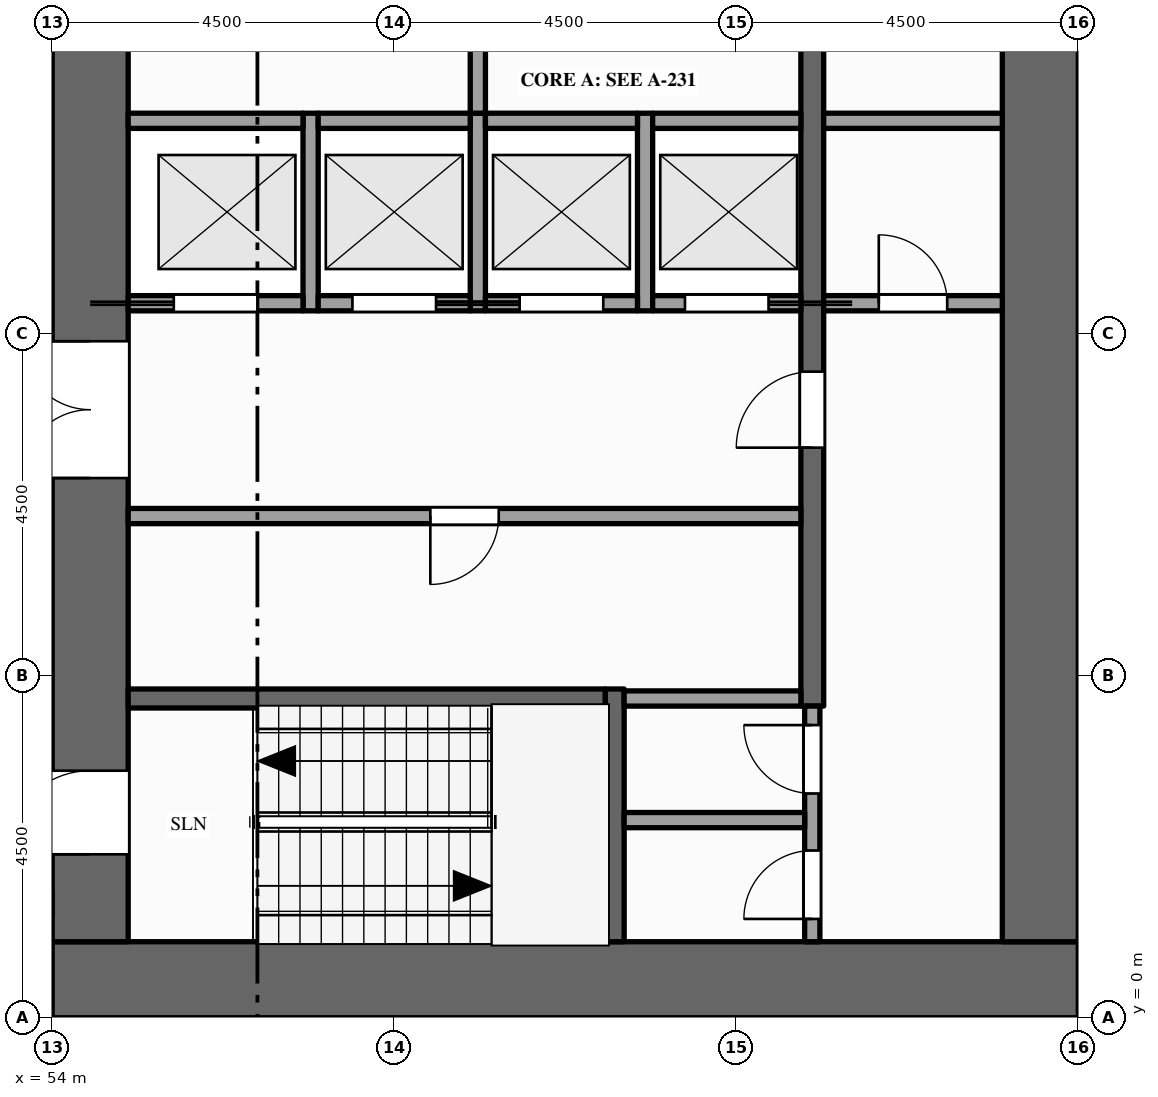
"""IFC4 building model, lengths in metres.
Left out: names, types, materials, properties, quantities, classifications, styles, units other than length and angle.
Written with IfcOpenShell. Run it as: python <this file> out.ifc"""

import sys

from ifc_helpers import new_model, si_unit, direction, frame, frame_2d, origin, place, context, subcontext, project, spatial, rectangle, extrude, element, fill, save


model = new_model("IFC4")
c1 = context("Model", 3, precision=1e-05, world=origin(), true_north=direction((0.0, 1.0)))
c2 = subcontext(c1, "Body", "Model", "MODEL_VIEW")
j1 = project(units=[si_unit("LENGTHUNIT", "METRE"), si_unit("PLANEANGLEUNIT", "RADIAN")], contexts=[c1])
p1 = place(None, origin())
s1 = spatial("IfcSite", under=j1, at=p1, CompositionType="ELEMENT")
p2 = place(p1, origin())
s2 = spatial("IfcBuilding", under=s1, at=p2, CompositionType="ELEMENT")
p3 = place(p2, frame((0.0, 0.0, 171.0)))
s3 = spatial("IfcBuildingStorey", under=s2, at=p3, CompositionType="ELEMENT", Elevation=171.0)
p4 = place(p3, frame((67.5, 0.5, -0.15), z_axis=(0.0, 0.0, 1.0), x_axis=(-1.0, 0.0, 0.0)))
e1 = element("IfcWall", 1, at=p4, inside=s3, PredefinedType="SHEAR", context=c2, shape_type="SweptSolid", body=[
    extrude(rectangle(XDim=13.5, YDim=1.0, at=frame_2d((6.75, 0.0))), origin(), (0.0, 0.0, 1.0), 4.0),
])
p5 = place(p3, frame((54.5, 1.0, -0.15), z_axis=(0.0, 0.0, 1.0), x_axis=(0.0, 1.0, 0.0)))
e2 = element("IfcWall", 2, at=p5, inside=s3, PredefinedType="SHEAR", context=c2, shape_type="SweptSolid", body=[
    extrude(rectangle(XDim=20.5, YDim=1.0, at=frame_2d((10.25, 0.0))), origin(), (0.0, 0.0, 1.0), 4.0),
])
p6 = place(p5, frame((6.1, 0.0, 0.15)))
e3 = element("IfcOpeningElement", 3, at=p6, cuts=e2, PredefinedType="OPENING", context=c2, shape_type="SweptSolid", body=[
    extrude(rectangle(XDim=1.8, YDim=2.1, at=frame_2d((0.9, 1.05))), frame((0.0, 0.51, 0.0), z_axis=(0.0, -1.0, 0.0), x_axis=(1.0, 0.0, 0.0)), (0.0, 0.0, 1.0), 1.02),
])
p7 = place(p5, frame((12.15, 0.0, 0.15)))
e4 = element("IfcOpeningElement", 4, at=p7, cuts=e2, PredefinedType="OPENING", context=c2, shape_type="SweptSolid", body=[
    extrude(rectangle(XDim=1.1, YDim=2.1, at=frame_2d((0.55, 1.05))), frame((0.0, 0.51, 0.0), z_axis=(0.0, -1.0, 0.0), x_axis=(1.0, 0.0, 0.0)), (0.0, 0.0, 1.0), 1.02),
])
p8 = place(p5, frame((1.15, 0.0, 0.15)))
e5 = element("IfcOpeningElement", 5, at=p8, cuts=e2, PredefinedType="OPENING", context=c2, shape_type="SweptSolid", body=[
    extrude(rectangle(XDim=1.1, YDim=2.1, at=frame_2d((0.55, 1.05))), frame((0.0, 0.51, 0.0), z_axis=(0.0, -1.0, 0.0), x_axis=(1.0, 0.0, 0.0)), (0.0, 0.0, 1.0), 1.02),
])
p9 = place(p5, frame((18.35, 0.0, 0.15)))
e6 = element("IfcOpeningElement", 6, at=p9, cuts=e2, PredefinedType="OPENING", context=c2, shape_type="SweptSolid", body=[
    extrude(rectangle(XDim=1.1, YDim=2.1, at=frame_2d((0.55, 1.05))), frame((0.0, 0.51, 0.0), z_axis=(0.0, -1.0, 0.0), x_axis=(1.0, 0.0, 0.0)), (0.0, 0.0, 1.0), 1.02),
])
p10 = place(p3, frame((67.0, 1.0, -0.15), z_axis=(0.0, 0.0, 1.0), x_axis=(0.0, 1.0, 0.0)))
e7 = element("IfcWall", 7, at=p10, inside=s3, PredefinedType="SHEAR", context=c2, shape_type="SweptSolid", body=[
    extrude(rectangle(XDim=20.5, YDim=1.0, at=frame_2d((10.25, 0.0))), origin(), (0.0, 0.0, 1.0), 4.0),
])
for number, where, z_axis, x_axis in (
    (8, (57.4, 9.3, 0.0), (0.0, 0.0, 1.0), (0.0, 1.0, 0.0)),
    (9, (59.6, 9.3, 0.0), (0.0, 0.0, 1.0), (0.0, 1.0, 0.0)),
):
    element("IfcWall", number, at=place(p3, frame(where, z_axis=z_axis, x_axis=x_axis)), inside=s3, PredefinedType="SOLIDWALL", context=c2, shape_type="SweptSolid", body=[
        extrude(rectangle(XDim=2.6, YDim=0.2, at=frame_2d((1.3, 0.0))), origin(), (0.0, 0.0, 1.0), 3.85),
    ])
p11 = place(p3, frame((59.6, 11.9, 0.0), z_axis=(0.0, 0.0, 1.0), x_axis=(0.0, 1.0, 0.0)))
e10 = element("IfcWall", 10, at=p11, inside=s3, PredefinedType="PARTITIONING", context=c2, shape_type="SweptSolid", body=[
    extrude(rectangle(XDim=3.6, YDim=0.2, at=frame_2d((1.8, 0.0))), origin(), (0.0, 0.0, 1.0), 3.85),
])
p12 = place(p11, frame((1.3, 0.0, 0.0)))
e11 = element("IfcOpeningElement", 11, at=p12, cuts=e10, PredefinedType="OPENING", context=c2, shape_type="SweptSolid", body=[
    extrude(rectangle(XDim=1.0, YDim=2.1, at=frame_2d((0.5, 1.05))), frame((0.0, 0.11, 0.0), z_axis=(0.0, -1.0, 0.0), x_axis=(1.0, 0.0, 0.0)), (0.0, 0.0, 1.0), 0.22),
])
p13 = place(p3, frame((61.4, 1.0, 0.0), z_axis=(0.0, 0.0, 1.0), x_axis=(0.0, 1.0, 0.0)))
e12 = element("IfcWall", 12, at=p13, inside=s3, PredefinedType="SHEAR", context=c2, shape_type="SweptSolid", body=[
    extrude(rectangle(XDim=3.325, YDim=0.25, at=frame_2d((1.663, 0.0))), origin(), (0.0, 0.0, 1.0), 3.85),
])
p14 = place(p3, frame((61.8, 9.3, 0.0), z_axis=(0.0, 0.0, 1.0), x_axis=(0.0, 1.0, 0.0)))
e13 = element("IfcWall", 13, at=p14, inside=s3, PredefinedType="SOLIDWALL", context=c2, shape_type="SweptSolid", body=[
    extrude(rectangle(XDim=2.6, YDim=0.2, at=frame_2d((1.3, 0.0))), origin(), (0.0, 0.0, 1.0), 3.85),
])
p15 = place(p3, frame((64.0, 1.0, 0.0), z_axis=(0.0, 0.0, 1.0), x_axis=(0.0, 1.0, 0.0)))
e14 = element("IfcWall", 14, at=p15, inside=s3, PredefinedType="PARTITIONING", context=c2, shape_type="SweptSolid", body=[
    extrude(rectangle(XDim=3.1, YDim=0.2, at=frame_2d((1.55, 0.0))), origin(), (0.0, 0.0, 1.0), 3.85),
])
p16 = place(p15, frame((0.3, 0.0, 0.0)))
e15 = element("IfcOpeningElement", 15, at=p16, cuts=e14, PredefinedType="OPENING", context=c2, shape_type="SweptSolid", body=[
    extrude(rectangle(XDim=0.9, YDim=2.1, at=frame_2d((0.45, 1.05))), frame((0.0, 0.11, 0.0), z_axis=(0.0, -1.0, 0.0), x_axis=(1.0, 0.0, 0.0)), (0.0, 0.0, 1.0), 0.22),
])
p17 = place(p15, frame((1.95, 0.0, 0.0)))
e16 = element("IfcOpeningElement", 16, at=p17, cuts=e14, PredefinedType="OPENING", context=c2, shape_type="SweptSolid", body=[
    extrude(rectangle(XDim=0.9, YDim=2.1, at=frame_2d((0.45, 1.05))), frame((0.0, 0.11, 0.0), z_axis=(0.0, -1.0, 0.0), x_axis=(1.0, 0.0, 0.0)), (0.0, 0.0, 1.0), 0.22),
])
p18 = place(p3, frame((64.0, 4.1, 0.0), z_axis=(0.0, 0.0, 1.0), x_axis=(0.0, 1.0, 0.0)))
e17 = element("IfcWall", 17, at=p18, inside=s3, PredefinedType="SHEAR", context=c2, shape_type="SweptSolid", body=[
    extrude(rectangle(XDim=14.5, YDim=0.3, at=frame_2d((7.25, 0.0))), origin(), (0.0, 0.0, 1.0), 3.85),
])
p19 = place(p18, frame((3.4, 0.0, 0.0)))
e18 = element("IfcOpeningElement", 18, at=p19, cuts=e17, PredefinedType="OPENING", context=c2, shape_type="SweptSolid", body=[
    extrude(rectangle(XDim=1.0, YDim=2.1, at=frame_2d((0.5, 1.05))), frame((0.0, 0.16, 0.0), z_axis=(0.0, -1.0, 0.0), x_axis=(1.0, 0.0, 0.0)), (0.0, 0.0, 1.0), 0.32),
])
p20 = place(p18, frame((9.1, 0.0, 0.0)))
e19 = element("IfcOpeningElement", 19, at=p20, cuts=e17, PredefinedType="OPENING", context=c2, shape_type="SweptSolid", body=[
    extrude(rectangle(XDim=1.0, YDim=2.1, at=frame_2d((0.5, 1.05))), frame((0.0, 0.16, 0.0), z_axis=(0.0, -1.0, 0.0), x_axis=(1.0, 0.0, 0.0)), (0.0, 0.0, 1.0), 0.32),
])
p21 = place(p3, frame((61.525, 2.6, 0.0), z_axis=(0.0, 0.0, 1.0), x_axis=(1.0, 0.0, 0.0)))
e20 = element("IfcWall", 20, at=p21, inside=s3, PredefinedType="PARTITIONING", context=c2, shape_type="SweptSolid", body=[
    extrude(rectangle(XDim=2.375, YDim=0.2, at=frame_2d((1.188, 0.0))), origin(), (0.0, 0.0, 1.0), 3.85),
])
p22 = place(p3, frame((55.0, 4.2, 0.0), z_axis=(0.0, 0.0, 1.0), x_axis=(1.0, 0.0, 0.0)))
e21 = element("IfcWall", 21, at=p22, inside=s3, PredefinedType="SHEAR", context=c2, shape_type="SweptSolid", body=[
    extrude(rectangle(XDim=6.275, YDim=0.25, at=frame_2d((3.137, 0.0))), origin(), (0.0, 0.0, 1.0), 3.85),
])
p23 = place(p3, frame((61.525, 4.2, 0.0), z_axis=(0.0, 0.0, 1.0), x_axis=(1.0, 0.0, 0.0)))
e22 = element("IfcWall", 22, at=p23, inside=s3, PredefinedType="PARTITIONING", context=c2, shape_type="SweptSolid", body=[
    extrude(rectangle(XDim=2.325, YDim=0.2, at=frame_2d((1.163, 0.0))), origin(), (0.0, 0.0, 1.0), 3.85),
])
p24 = place(p3, frame((55.0, 6.6, 0.0), z_axis=(0.0, 0.0, 1.0), x_axis=(1.0, 0.0, 0.0)))
e23 = element("IfcWall", 23, at=p24, inside=s3, PredefinedType="PARTITIONING", context=c2, shape_type="SweptSolid", body=[
    extrude(rectangle(XDim=8.85, YDim=0.2, at=frame_2d((4.425, 0.0))), origin(), (0.0, 0.0, 1.0), 3.85),
])
p25 = place(p24, frame((3.975, 0.0, 0.0)))
e24 = element("IfcOpeningElement", 24, at=p25, cuts=e23, PredefinedType="OPENING", context=c2, shape_type="SweptSolid", body=[
    extrude(rectangle(XDim=0.9, YDim=2.1, at=frame_2d((0.45, 1.05))), frame((0.0, 0.11, 0.0), z_axis=(0.0, -1.0, 0.0), x_axis=(1.0, 0.0, 0.0)), (0.0, 0.0, 1.0), 0.22),
])
p26 = place(p3, frame((55.0, 9.4, 0.0), z_axis=(0.0, 0.0, 1.0), x_axis=(1.0, 0.0, 0.0)))
e25 = element("IfcWall", 25, at=p26, inside=s3, PredefinedType="SOLIDWALL", context=c2, shape_type="SweptSolid", body=[
    extrude(rectangle(XDim=2.3, YDim=0.2, at=frame_2d((1.15, 0.0))), origin(), (0.0, 0.0, 1.0), 3.85),
])
p27 = place(p26, frame((0.6, 0.0, 0.012)))
e26 = element("IfcOpeningElement", 26, at=p27, cuts=e25, PredefinedType="OPENING", context=c2, shape_type="SweptSolid", body=[
    extrude(rectangle(XDim=1.1, YDim=2.1, at=frame_2d((0.55, 1.05))), frame((0.0, 0.11, 0.0), z_axis=(0.0, -1.0, 0.0), x_axis=(1.0, 0.0, 0.0)), (0.0, 0.0, 1.0), 0.22),
])
p28 = place(p3, frame((57.5, 9.4, 0.0), z_axis=(0.0, 0.0, 1.0), x_axis=(1.0, 0.0, 0.0)))
e27 = element("IfcWall", 27, at=p28, inside=s3, PredefinedType="SOLIDWALL", context=c2, shape_type="SweptSolid", body=[
    extrude(rectangle(XDim=2.0, YDim=0.2, at=frame_2d((1.0, 0.0))), origin(), (0.0, 0.0, 1.0), 3.85),
])
p29 = place(p28, frame((0.45, 0.0, 0.012)))
e28 = element("IfcOpeningElement", 28, at=p29, cuts=e27, PredefinedType="OPENING", context=c2, shape_type="SweptSolid", body=[
    extrude(rectangle(XDim=1.1, YDim=2.1, at=frame_2d((0.55, 1.05))), frame((0.0, 0.11, 0.0), z_axis=(0.0, -1.0, 0.0), x_axis=(1.0, 0.0, 0.0)), (0.0, 0.0, 1.0), 0.22),
])
p30 = place(p3, frame((59.7, 9.4, 0.0), z_axis=(0.0, 0.0, 1.0), x_axis=(1.0, 0.0, 0.0)))
e29 = element("IfcWall", 29, at=p30, inside=s3, PredefinedType="SOLIDWALL", context=c2, shape_type="SweptSolid", body=[
    extrude(rectangle(XDim=2.0, YDim=0.2, at=frame_2d((1.0, 0.0))), origin(), (0.0, 0.0, 1.0), 3.85),
])
p31 = place(p30, frame((0.45, 0.0, 0.012)))
e30 = element("IfcOpeningElement", 30, at=p31, cuts=e29, PredefinedType="OPENING", context=c2, shape_type="SweptSolid", body=[
    extrude(rectangle(XDim=1.1, YDim=2.1, at=frame_2d((0.55, 1.05))), frame((0.0, 0.11, 0.0), z_axis=(0.0, -1.0, 0.0), x_axis=(1.0, 0.0, 0.0)), (0.0, 0.0, 1.0), 0.22),
])
p32 = place(p3, frame((61.9, 9.4, 0.0), z_axis=(0.0, 0.0, 1.0), x_axis=(1.0, 0.0, 0.0)))
e31 = element("IfcWall", 31, at=p32, inside=s3, PredefinedType="SOLIDWALL", context=c2, shape_type="SweptSolid", body=[
    extrude(rectangle(XDim=1.95, YDim=0.2, at=frame_2d((0.975, 0.0))), origin(), (0.0, 0.0, 1.0), 3.85),
])
p33 = place(p32, frame((0.425, 0.0, 0.012)))
e32 = element("IfcOpeningElement", 32, at=p33, cuts=e31, PredefinedType="OPENING", context=c2, shape_type="SweptSolid", body=[
    extrude(rectangle(XDim=1.1, YDim=2.1, at=frame_2d((0.55, 1.05))), frame((0.0, 0.11, 0.0), z_axis=(0.0, -1.0, 0.0), x_axis=(1.0, 0.0, 0.0)), (0.0, 0.0, 1.0), 0.22),
])
p34 = place(p3, frame((64.15, 9.4, 0.0), z_axis=(0.0, 0.0, 1.0), x_axis=(1.0, 0.0, 0.0)))
e33 = element("IfcWall", 33, at=p34, inside=s3, PredefinedType="PARTITIONING", context=c2, shape_type="SweptSolid", body=[
    extrude(rectangle(XDim=2.35, YDim=0.2, at=frame_2d((1.175, 0.0))), origin(), (0.0, 0.0, 1.0), 3.85),
])
p35 = place(p34, frame((0.725, 0.0, 0.0)))
e34 = element("IfcOpeningElement", 34, at=p35, cuts=e33, PredefinedType="OPENING", context=c2, shape_type="SweptSolid", body=[
    extrude(rectangle(XDim=0.9, YDim=2.1, at=frame_2d((0.45, 1.05))), frame((0.0, 0.11, 0.0), z_axis=(0.0, -1.0, 0.0), x_axis=(1.0, 0.0, 0.0)), (0.0, 0.0, 1.0), 0.22),
])
p36 = place(p3, frame((55.0, 11.8, 0.0), z_axis=(0.0, 0.0, 1.0), x_axis=(1.0, 0.0, 0.0)))
e35 = element("IfcWall", 35, at=p36, inside=s3, PredefinedType="SOLIDWALL", context=c2, shape_type="SweptSolid", body=[
    extrude(rectangle(XDim=2.3, YDim=0.2, at=frame_2d((1.15, 0.0))), origin(), (0.0, 0.0, 1.0), 3.85),
])
for number, where, z_axis, x_axis in (
    (36, (57.5, 11.8, 0.0), (0.0, 0.0, 1.0), (1.0, 0.0, 0.0)),
    (37, (59.7, 11.8, 0.0), (0.0, 0.0, 1.0), (1.0, 0.0, 0.0)),
):
    element("IfcWall", number, at=place(p3, frame(where, z_axis=z_axis, x_axis=x_axis)), inside=s3, PredefinedType="SOLIDWALL", context=c2, shape_type="SweptSolid", body=[
        extrude(rectangle(XDim=2.0, YDim=0.2, at=frame_2d((1.0, 0.0))), origin(), (0.0, 0.0, 1.0), 3.85),
    ])
p37 = place(p3, frame((61.9, 11.8, 0.0), z_axis=(0.0, 0.0, 1.0), x_axis=(1.0, 0.0, 0.0)))
e38 = element("IfcWall", 38, at=p37, inside=s3, PredefinedType="SOLIDWALL", context=c2, shape_type="SweptSolid", body=[
    extrude(rectangle(XDim=1.95, YDim=0.2, at=frame_2d((0.975, 0.0))), origin(), (0.0, 0.0, 1.0), 3.85),
])
p38 = place(p3, frame((64.15, 11.8, 0.0), z_axis=(0.0, 0.0, 1.0), x_axis=(1.0, 0.0, 0.0)))
e39 = element("IfcWall", 39, at=p38, inside=s3, PredefinedType="PARTITIONING", context=c2, shape_type="SweptSolid", body=[
    extrude(rectangle(XDim=2.35, YDim=0.2, at=frame_2d((1.175, 0.0))), origin(), (0.0, 0.0, 1.0), 3.85),
])
p39 = place(p27, origin())
e40 = element("IfcDoor", 40, at=p39, inside=s3, OperationType="SLIDING_TO_LEFT", PredefinedType="DOOR", context=c2, shape_type="SweptSolid", body=[
    extrude(rectangle(XDim=1.1, YDim=2.1, at=frame_2d((0.55, 1.05))), frame((0.0, 0.025, 0.0), z_axis=(0.0, -1.0, 0.0), x_axis=(1.0, 0.0, 0.0)), (0.0, 0.0, 1.0), 0.05),
])
fill(e26, e40)
p40 = place(p29, origin())
e41 = element("IfcDoor", 41, at=p40, inside=s3, OperationType="SLIDING_TO_RIGHT", PredefinedType="DOOR", context=c2, shape_type="SweptSolid", body=[
    extrude(rectangle(XDim=1.1, YDim=2.1, at=frame_2d((0.55, 1.05))), frame((0.0, 0.025, 0.0), z_axis=(0.0, -1.0, 0.0), x_axis=(1.0, 0.0, 0.0)), (0.0, 0.0, 1.0), 0.05),
])
fill(e28, e41)
p41 = place(p31, origin())
e42 = element("IfcDoor", 42, at=p41, inside=s3, OperationType="SLIDING_TO_LEFT", PredefinedType="DOOR", context=c2, shape_type="SweptSolid", body=[
    extrude(rectangle(XDim=1.1, YDim=2.1, at=frame_2d((0.55, 1.05))), frame((0.0, 0.025, 0.0), z_axis=(0.0, -1.0, 0.0), x_axis=(1.0, 0.0, 0.0)), (0.0, 0.0, 1.0), 0.05),
])
fill(e30, e42)
p42 = place(p33, origin())
e43 = element("IfcDoor", 43, at=p42, inside=s3, OperationType="SLIDING_TO_RIGHT", PredefinedType="DOOR", context=c2, shape_type="SweptSolid", body=[
    extrude(rectangle(XDim=1.1, YDim=2.1, at=frame_2d((0.55, 1.05))), frame((0.0, 0.025, 0.0), z_axis=(0.0, -1.0, 0.0), x_axis=(1.0, 0.0, 0.0)), (0.0, 0.0, 1.0), 0.05),
])
fill(e32, e43)
p43 = place(p6, origin())
e44 = element("IfcDoor", 44, at=p43, inside=s3, OperationType="DOUBLE_DOOR_SINGLE_SWING", PredefinedType="DOOR", context=c2, shape_type="SweptSolid", body=[
    extrude(rectangle(XDim=1.8, YDim=2.1, at=frame_2d((0.9, 1.05))), frame((0.0, 0.025, 0.0), z_axis=(0.0, -1.0, 0.0), x_axis=(1.0, 0.0, 0.0)), (0.0, 0.0, 1.0), 0.05),
])
fill(e3, e44)
p44 = place(p19, origin())
e45 = element("IfcDoor", 45, at=p44, inside=s3, OperationType="SINGLE_SWING_LEFT", PredefinedType="DOOR", context=c2, shape_type="SweptSolid", body=[
    extrude(rectangle(XDim=1.0, YDim=2.1, at=frame_2d((0.5, 1.05))), frame((0.0, 0.025, 0.0), z_axis=(0.0, -1.0, 0.0), x_axis=(1.0, 0.0, 0.0)), (0.0, 0.0, 1.0), 0.05),
])
fill(e18, e45)
p45 = place(p35, origin())
e46 = element("IfcDoor", 46, at=p45, inside=s3, OperationType="SINGLE_SWING_LEFT", PredefinedType="DOOR", context=c2, shape_type="SweptSolid", body=[
    extrude(rectangle(XDim=0.9, YDim=2.1, at=frame_2d((0.45, 1.05))), frame((0.0, 0.025, 0.0), z_axis=(0.0, -1.0, 0.0), x_axis=(1.0, 0.0, 0.0)), (0.0, 0.0, 1.0), 0.05),
])
fill(e34, e46)
p46 = place(p8, origin())
e47 = element("IfcDoor", 47, at=p46, inside=s3, OperationType="SINGLE_SWING_LEFT", PredefinedType="DOOR", context=c2, shape_type="SweptSolid", body=[
    extrude(rectangle(XDim=1.1, YDim=2.1, at=frame_2d((0.55, 1.05))), frame((0.0, 0.025, 0.0), z_axis=(0.0, -1.0, 0.0), x_axis=(1.0, 0.0, 0.0)), (0.0, 0.0, 1.0), 0.05),
])
fill(e5, e47)
p47 = place(p16, origin())
e48 = element("IfcDoor", 48, at=p47, inside=s3, OperationType="SINGLE_SWING_LEFT", PredefinedType="DOOR", context=c2, shape_type="SweptSolid", body=[
    extrude(rectangle(XDim=0.9, YDim=2.1, at=frame_2d((0.45, 1.05))), frame((0.0, 0.025, 0.0), z_axis=(0.0, -1.0, 0.0), x_axis=(1.0, 0.0, 0.0)), (0.0, 0.0, 1.0), 0.05),
])
fill(e15, e48)
p48 = place(p17, origin())
e49 = element("IfcDoor", 49, at=p48, inside=s3, OperationType="SINGLE_SWING_RIGHT", PredefinedType="DOOR", context=c2, shape_type="SweptSolid", body=[
    extrude(rectangle(XDim=0.9, YDim=2.1, at=frame_2d((0.45, 1.05))), frame((0.0, 0.025, 0.0), z_axis=(0.0, -1.0, 0.0), x_axis=(1.0, 0.0, 0.0)), (0.0, 0.0, 1.0), 0.05),
])
fill(e16, e49)
p49 = place(p25, origin())
e50 = element("IfcDoor", 50, at=p49, inside=s3, OperationType="SINGLE_SWING_LEFT", PredefinedType="DOOR", context=c2, shape_type="SweptSolid", body=[
    extrude(rectangle(XDim=0.9, YDim=2.1, at=frame_2d((0.45, 1.05))), frame((0.0, 0.025, 0.0), z_axis=(0.0, -1.0, 0.0), x_axis=(1.0, 0.0, 0.0)), (0.0, 0.0, 1.0), 0.05),
])
fill(e24, e50)
save(model, sys.argv[1])
